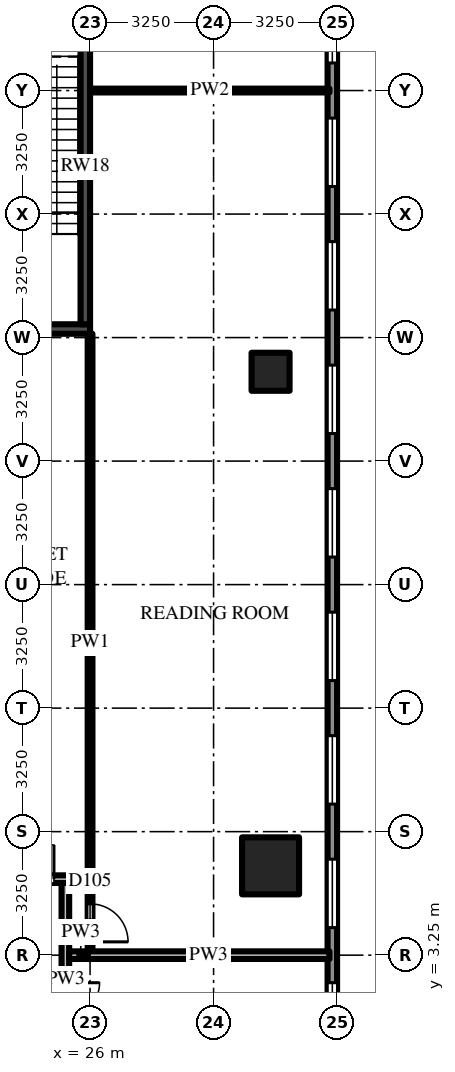
"""IFC4 building model, lengths in metres.
Left out: names, types, materials, properties, quantities, classifications, styles, units other than length and angle.
Written with IfcOpenShell. Run it as: python <this file> out.ifc"""

import sys

from ifc_helpers import new_model, si_unit, direction, frame, frame_2d, origin, origin_2d, place, context, subcontext, project, spatial, rectangle, extrude, source, transform, mapped, element, fill, save


model = new_model("IFC4")
c1 = context("Model", 3, precision=1e-05, world=origin(), true_north=direction((0.0, 1.0)))
c2 = subcontext(c1, "Body", "Model", "MODEL_VIEW")
j1 = project(units=[si_unit("LENGTHUNIT", "METRE"), si_unit("PLANEANGLEUNIT", "RADIAN")], contexts=[c1])
p1 = place(None, origin())
s1 = spatial("IfcSite", under=j1, at=p1, CompositionType="ELEMENT")
p2 = place(p1, origin())
s2 = spatial("IfcBuilding", under=s1, at=p2, CompositionType="ELEMENT")
p3 = place(p2, frame((0.0, 0.0, 24.0)))
s3 = spatial("IfcBuildingStorey", under=s2, at=p3, CompositionType="ELEMENT", Elevation=24.0)
m1 = source(origin(), c2, "Body", "SweptSolid", [
    extrude(rectangle(XDim=1.5, YDim=1.5, at=origin_2d()), origin(), (0.0, 0.0, 1.0), 5.0),
])
p4 = place(p3, frame((30.75, 5.6, 0.0), z_axis=(0.0, 0.0, 1.0), x_axis=(1.0, 0.0, 0.0)))
e1 = element("IfcColumn", 1, at=p4, inside=s3, PredefinedType="COLUMN", context=c2, shape_type="MappedRepresentation", body=[
    mapped(m1, transform((0.0, 0.0, 0.0))),
])
m2 = source(origin(), c2, "Body", "SweptSolid", [
    extrude(rectangle(XDim=1.0, YDim=1.0, at=origin_2d()), origin(), (0.0, 0.0, 1.0), 5.0),
])
p5 = place(p3, frame((30.75, 18.6, 0.0), z_axis=(0.0, 0.0, 1.0), x_axis=(1.0, 0.0, 0.0)))
e2 = element("IfcColumn", 2, at=p5, inside=s3, PredefinedType="COLUMN", context=c2, shape_type="MappedRepresentation", body=[
    mapped(m2, transform((0.0, 0.0, 0.0))),
])
m3 = source(origin(), c2, "Body", "SweptSolid", [
    extrude(rectangle(XDim=6.5, YDim=0.25, at=frame_2d((3.25, 0.0))), origin(), (0.0, 0.0, 1.0), 4.7),
])
p6 = place(p3, frame((19.5, 19.725, 0.0), z_axis=(0.0, 0.0, 1.0), x_axis=(1.0, 0.0, 0.0)))
e3 = element("IfcWall", 3, at=p6, inside=s3, PredefinedType="SHEAR", context=c2, shape_type="MappedRepresentation", body=[
    mapped(m3, transform((0.0, 0.0, 0.0))),
])
m4 = source(origin(), c2, "Body", "SweptSolid", [
    extrude(rectangle(XDim=8.3, YDim=0.25, at=frame_2d((4.15, 0.0))), origin(), (0.0, 0.0, 1.0), 4.7),
])
p7 = place(p3, frame((25.875, 19.85, 0.0), z_axis=(0.0, 0.0, 1.0), x_axis=(0.0, 1.0, 0.0)))
e4 = element("IfcWall", 4, at=p7, inside=s3, PredefinedType="SHEAR", context=c2, shape_type="MappedRepresentation", body=[
    mapped(m4, transform((0.0, 0.0, 0.0))),
])
m5 = source(origin(), c2, "Body", "SweptSolid", [
    extrude(rectangle(XDim=58.5, YDim=0.25, at=frame_2d((29.25, 0.0))), origin(), (0.0, 0.0, 1.0), 4.7),
])
p8 = place(p3, frame((32.375, -29.25, 0.0), z_axis=(0.0, 0.0, 1.0), x_axis=(0.0, 1.0, 0.0)))
e5 = element("IfcWall", 5, at=p8, inside=s3, PredefinedType="SOLIDWALL", context=c2, shape_type="MappedRepresentation", body=[
    mapped(m5, transform((0.0, 0.0, 0.0))),
])
m6 = source(origin(), c2, "Body", "SweptSolid", [
    extrude(rectangle(XDim=1.8, YDim=3.3, at=frame_2d((0.9, 1.65))), frame((0.0, 0.135, 0.0), z_axis=(0.0, -1.0, 0.0), x_axis=(1.0, 0.0, 0.0)), (0.0, 0.0, 1.0), 0.27),
])
p9 = place(p8, frame((0.725, 0.0, 0.6)))
e6 = element("IfcOpeningElement", 6, at=p9, cuts=e5, PredefinedType="OPENING", context=c2, shape_type="MappedRepresentation", body=[
    mapped(m6, transform((0.0, 0.0, 0.0))),
])
p10 = place(p8, frame((3.975, 0.0, 0.6)))
e7 = element("IfcOpeningElement", 7, at=p10, cuts=e5, PredefinedType="OPENING", context=c2, shape_type="MappedRepresentation", body=[
    mapped(m6, transform((0.0, 0.0, 0.0))),
])
p11 = place(p8, frame((7.225, 0.0, 0.6)))
e8 = element("IfcOpeningElement", 8, at=p11, cuts=e5, PredefinedType="OPENING", context=c2, shape_type="MappedRepresentation", body=[
    mapped(m6, transform((0.0, 0.0, 0.0))),
])
p12 = place(p8, frame((10.475, 0.0, 0.6)))
e9 = element("IfcOpeningElement", 9, at=p12, cuts=e5, PredefinedType="OPENING", context=c2, shape_type="MappedRepresentation", body=[
    mapped(m6, transform((0.0, 0.0, 0.0))),
])
p13 = place(p8, frame((13.725, 0.0, 0.6)))
e10 = element("IfcOpeningElement", 10, at=p13, cuts=e5, PredefinedType="OPENING", context=c2, shape_type="MappedRepresentation", body=[
    mapped(m6, transform((0.0, 0.0, 0.0))),
])
p14 = place(p8, frame((16.975, 0.0, 0.6)))
e11 = element("IfcOpeningElement", 11, at=p14, cuts=e5, PredefinedType="OPENING", context=c2, shape_type="MappedRepresentation", body=[
    mapped(m6, transform((0.0, 0.0, 0.0))),
])
p15 = place(p8, frame((20.225, 0.0, 0.6)))
e12 = element("IfcOpeningElement", 12, at=p15, cuts=e5, PredefinedType="OPENING", context=c2, shape_type="MappedRepresentation", body=[
    mapped(m6, transform((0.0, 0.0, 0.0))),
])
p16 = place(p8, frame((23.475, 0.0, 0.6)))
e13 = element("IfcOpeningElement", 13, at=p16, cuts=e5, PredefinedType="OPENING", context=c2, shape_type="MappedRepresentation", body=[
    mapped(m6, transform((0.0, 0.0, 0.0))),
])
p17 = place(p8, frame((26.725, 0.0, 0.6)))
e14 = element("IfcOpeningElement", 14, at=p17, cuts=e5, PredefinedType="OPENING", context=c2, shape_type="MappedRepresentation", body=[
    mapped(m6, transform((0.0, 0.0, 0.0))),
])
p18 = place(p8, frame((29.975, 0.0, 0.6)))
e15 = element("IfcOpeningElement", 15, at=p18, cuts=e5, PredefinedType="OPENING", context=c2, shape_type="MappedRepresentation", body=[
    mapped(m6, transform((0.0, 0.0, 0.0))),
])
p19 = place(p8, frame((33.225, 0.0, 0.6)))
e16 = element("IfcOpeningElement", 16, at=p19, cuts=e5, PredefinedType="OPENING", context=c2, shape_type="MappedRepresentation", body=[
    mapped(m6, transform((0.0, 0.0, 0.0))),
])
p20 = place(p8, frame((36.475, 0.0, 0.6)))
e17 = element("IfcOpeningElement", 17, at=p20, cuts=e5, PredefinedType="OPENING", context=c2, shape_type="MappedRepresentation", body=[
    mapped(m6, transform((0.0, 0.0, 0.0))),
])
p21 = place(p8, frame((39.725, 0.0, 0.6)))
e18 = element("IfcOpeningElement", 18, at=p21, cuts=e5, PredefinedType="OPENING", context=c2, shape_type="MappedRepresentation", body=[
    mapped(m6, transform((0.0, 0.0, 0.0))),
])
p22 = place(p8, frame((42.975, 0.0, 0.6)))
e19 = element("IfcOpeningElement", 19, at=p22, cuts=e5, PredefinedType="OPENING", context=c2, shape_type="MappedRepresentation", body=[
    mapped(m6, transform((0.0, 0.0, 0.0))),
])
p23 = place(p8, frame((46.225, 0.0, 0.6)))
e20 = element("IfcOpeningElement", 20, at=p23, cuts=e5, PredefinedType="OPENING", context=c2, shape_type="MappedRepresentation", body=[
    mapped(m6, transform((0.0, 0.0, 0.0))),
])
p24 = place(p8, frame((49.475, 0.0, 0.6)))
e21 = element("IfcOpeningElement", 21, at=p24, cuts=e5, PredefinedType="OPENING", context=c2, shape_type="MappedRepresentation", body=[
    mapped(m6, transform((0.0, 0.0, 0.0))),
])
p25 = place(p8, frame((52.725, 0.0, 0.6)))
e22 = element("IfcOpeningElement", 22, at=p25, cuts=e5, PredefinedType="OPENING", context=c2, shape_type="MappedRepresentation", body=[
    mapped(m6, transform((0.0, 0.0, 0.0))),
])
p26 = place(p8, frame((55.975, 0.0, 0.6)))
e23 = element("IfcOpeningElement", 23, at=p26, cuts=e5, PredefinedType="OPENING", context=c2, shape_type="MappedRepresentation", body=[
    mapped(m6, transform((0.0, 0.0, 0.0))),
])
m7 = source(origin(), c2, "Body", "SweptSolid", [
    extrude(rectangle(XDim=5.05, YDim=0.2, at=frame_2d((2.525, 0.0))), origin(), (0.0, 0.0, 1.0), 4.077),
])
p27 = place(p3, frame((25.35, 5.15, 0.0), z_axis=(0.0, 0.0, 1.0), x_axis=(0.0, -1.0, 0.0)))
e24 = element("IfcWall", 24, at=p27, inside=s3, PredefinedType="PARTITIONING", context=c2, shape_type="MappedRepresentation", body=[
    mapped(m7, transform((0.0, 0.0, 0.0))),
])
m8 = source(origin(), c2, "Body", "SweptSolid", [
    extrude(rectangle(XDim=1.8, YDim=2.1, at=frame_2d((0.9, 1.05))), frame((0.0, 0.11, 0.0), z_axis=(0.0, -1.0, 0.0), x_axis=(1.0, 0.0, 0.0)), (0.0, 0.0, 1.0), 0.22),
])
p28 = place(p27, frame((2.625, 0.0, 0.0)))
e25 = element("IfcOpeningElement", 25, at=p28, cuts=e24, PredefinedType="OPENING", context=c2, shape_type="MappedRepresentation", body=[
    mapped(m8, transform((0.0, 0.0, 0.0))),
])
m9 = source(origin(), c2, "Body", "SweptSolid", [
    extrude(rectangle(XDim=16.25, YDim=0.125, at=frame_2d((8.125, 0.0))), origin(), (0.0, 0.0, 1.0), 3.762),
])
p29 = place(p3, frame((26.0, 19.6, 0.0), z_axis=(0.0, 0.0, 1.0), x_axis=(0.0, -1.0, 0.0)))
e26 = element("IfcWall", 26, at=p29, inside=s3, PredefinedType="PARTITIONING", context=c2, shape_type="MappedRepresentation", body=[
    mapped(m9, transform((0.0, 0.0, 0.0))),
])
m10 = source(origin(), c2, "Body", "SweptSolid", [
    extrude(rectangle(XDim=1.0, YDim=2.1, at=frame_2d((0.5, 1.05))), frame((0.0, 0.073, 0.0), z_axis=(0.0, -1.0, 0.0), x_axis=(1.0, 0.0, 0.0)), (0.0, 0.0, 1.0), 0.145),
])
p30 = place(p29, frame((15.0, 0.0, 0.0)))
e27 = element("IfcOpeningElement", 27, at=p30, cuts=e26, PredefinedType="OPENING", context=c2, shape_type="MappedRepresentation", body=[
    mapped(m10, transform((0.0, 0.0, 0.0))),
])
m11 = source(origin(), c2, "Body", "SweptSolid", [
    extrude(rectangle(XDim=0.613, YDim=0.2, at=frame_2d((0.306, 0.0))), origin(), (0.0, 0.0, 1.0), 4.7),
])
p31 = place(p3, frame((25.45, 3.25, 0.0), z_axis=(0.0, 0.0, 1.0), x_axis=(1.0, 0.0, 0.0)))
e28 = element("IfcWall", 28, at=p31, inside=s3, PredefinedType="PARTITIONING", context=c2, shape_type="MappedRepresentation", body=[
    mapped(m11, transform((0.0, 0.0, 0.0))),
])
m12 = source(origin(), c2, "Body", "SweptSolid", [
    extrude(rectangle(XDim=6.363, YDim=0.2, at=frame_2d((3.181, 0.0))), origin(), (0.0, 0.0, 1.0), 3.918),
])
p32 = place(p3, frame((25.938, 3.25, 0.0), z_axis=(0.0, 0.0, 1.0), x_axis=(1.0, 0.0, 0.0)))
e29 = element("IfcWall", 29, at=p32, inside=s3, PredefinedType="PARTITIONING", context=c2, shape_type="MappedRepresentation", body=[
    mapped(m12, transform((0.0, 0.0, 0.0))),
])
m13 = source(origin(), c2, "Body", "SweptSolid", [
    extrude(rectangle(XDim=2.5, YDim=0.2, at=frame_2d((1.25, 0.0))), origin(), (0.0, 0.0, 1.0), 4.7),
])
p33 = place(p3, frame((22.95, 5.25, 0.0), z_axis=(0.0, 0.0, 1.0), x_axis=(1.0, 0.0, 0.0)))
e30 = element("IfcWall", 30, at=p33, inside=s3, PredefinedType="PARTITIONING", context=c2, shape_type="MappedRepresentation", body=[
    mapped(m13, transform((0.0, 0.0, 0.0))),
])
p34 = place(p33, frame((0.3, 0.0, 0.0)))
e31 = element("IfcOpeningElement", 31, at=p34, cuts=e30, PredefinedType="OPENING", context=c2, shape_type="MappedRepresentation", body=[
    mapped(m8, transform((0.0, 0.0, 0.0))),
])
m14 = source(origin(), c2, "Body", "SweptSolid", [
    extrude(rectangle(XDim=6.3, YDim=0.1, at=frame_2d((3.15, 0.0))), origin(), (0.0, 0.0, 1.0), 3.762),
])
p35 = place(p3, frame((26.0, 26.0, 0.0), z_axis=(0.0, 0.0, 1.0), x_axis=(1.0, 0.0, 0.0)))
e32 = element("IfcWall", 32, at=p35, inside=s3, PredefinedType="PARTITIONING", context=c2, shape_type="MappedRepresentation", body=[
    mapped(m14, transform((0.0, 0.0, 0.0))),
])
m15 = source(origin(), c2, "Body", "SweptSolid", [
    extrude(rectangle(XDim=1.8, YDim=3.3, at=frame_2d((0.9, 1.65))), frame((0.0, 0.03, 0.0), z_axis=(0.0, -1.0, 0.0), x_axis=(1.0, 0.0, 0.0)), (0.0, 0.0, 1.0), 0.06),
])
p36 = place(p18, origin())
e33 = element("IfcWindow", 33, at=p36, inside=s3, PartitioningType="SINGLE_PANEL", PredefinedType="WINDOW", context=c2, shape_type="MappedRepresentation", body=[
    mapped(m15, transform((0.0, 0.0, 0.0))),
])
fill(e15, e33)
p37 = place(p19, origin())
e34 = element("IfcWindow", 34, at=p37, inside=s3, PartitioningType="SINGLE_PANEL", PredefinedType="WINDOW", context=c2, shape_type="MappedRepresentation", body=[
    mapped(m15, transform((0.0, 0.0, 0.0))),
])
fill(e16, e34)
p38 = place(p20, origin())
e35 = element("IfcWindow", 35, at=p38, inside=s3, PartitioningType="SINGLE_PANEL", PredefinedType="WINDOW", context=c2, shape_type="MappedRepresentation", body=[
    mapped(m15, transform((0.0, 0.0, 0.0))),
])
fill(e17, e35)
p39 = place(p21, origin())
e36 = element("IfcWindow", 36, at=p39, inside=s3, PartitioningType="SINGLE_PANEL", PredefinedType="WINDOW", context=c2, shape_type="MappedRepresentation", body=[
    mapped(m15, transform((0.0, 0.0, 0.0))),
])
fill(e18, e36)
p40 = place(p22, origin())
e37 = element("IfcWindow", 37, at=p40, inside=s3, PartitioningType="SINGLE_PANEL", PredefinedType="WINDOW", context=c2, shape_type="MappedRepresentation", body=[
    mapped(m15, transform((0.0, 0.0, 0.0))),
])
fill(e19, e37)
p41 = place(p23, origin())
e38 = element("IfcWindow", 38, at=p41, inside=s3, PartitioningType="SINGLE_PANEL", PredefinedType="WINDOW", context=c2, shape_type="MappedRepresentation", body=[
    mapped(m15, transform((0.0, 0.0, 0.0))),
])
fill(e20, e38)
p42 = place(p24, origin())
e39 = element("IfcWindow", 39, at=p42, inside=s3, PartitioningType="SINGLE_PANEL", PredefinedType="WINDOW", context=c2, shape_type="MappedRepresentation", body=[
    mapped(m15, transform((0.0, 0.0, 0.0))),
])
fill(e21, e39)
p43 = place(p25, origin())
e40 = element("IfcWindow", 40, at=p43, inside=s3, PartitioningType="SINGLE_PANEL", PredefinedType="WINDOW", context=c2, shape_type="MappedRepresentation", body=[
    mapped(m15, transform((0.0, 0.0, 0.0))),
])
fill(e22, e40)
p44 = place(p26, origin())
e41 = element("IfcWindow", 41, at=p44, inside=s3, PartitioningType="SINGLE_PANEL", PredefinedType="WINDOW", context=c2, shape_type="MappedRepresentation", body=[
    mapped(m15, transform((0.0, 0.0, 0.0))),
])
fill(e23, e41)
m16 = source(origin(), c2, "Body", "SweptSolid", [
    extrude(rectangle(XDim=1.8, YDim=2.1, at=frame_2d((0.9, 1.05))), frame((0.0, 0.025, 0.0), z_axis=(0.0, -1.0, 0.0), x_axis=(1.0, 0.0, 0.0)), (0.0, 0.0, 1.0), 0.05),
])
p45 = place(p28, origin())
e42 = element("IfcDoor", 42, at=p45, inside=s3, OperationType="DOUBLE_DOOR_SINGLE_SWING", PredefinedType="DOOR", context=c2, shape_type="MappedRepresentation", body=[
    mapped(m16, transform((0.0, 0.0, 0.0))),
])
fill(e25, e42)
m17 = source(origin(), c2, "Body", "SweptSolid", [
    extrude(rectangle(XDim=1.0, YDim=2.1, at=frame_2d((0.5, 1.05))), frame((0.0, 0.025, 0.0), z_axis=(0.0, -1.0, 0.0), x_axis=(1.0, 0.0, 0.0)), (0.0, 0.0, 1.0), 0.05),
])
p46 = place(p30, origin())
e43 = element("IfcDoor", 43, at=p46, inside=s3, OperationType="SINGLE_SWING_RIGHT", PredefinedType="DOOR", context=c2, shape_type="MappedRepresentation", body=[
    mapped(m17, transform((0.0, 0.0, 0.0))),
])
fill(e27, e43)
p47 = place(p34, origin())
e44 = element("IfcDoor", 44, at=p47, inside=s3, OperationType="DOUBLE_DOOR_SINGLE_SWING", PredefinedType="DOOR", context=c2, shape_type="MappedRepresentation", body=[
    mapped(m16, transform((0.0, 0.0, 0.0))),
])
fill(e31, e44)
save(model, sys.argv[1])
